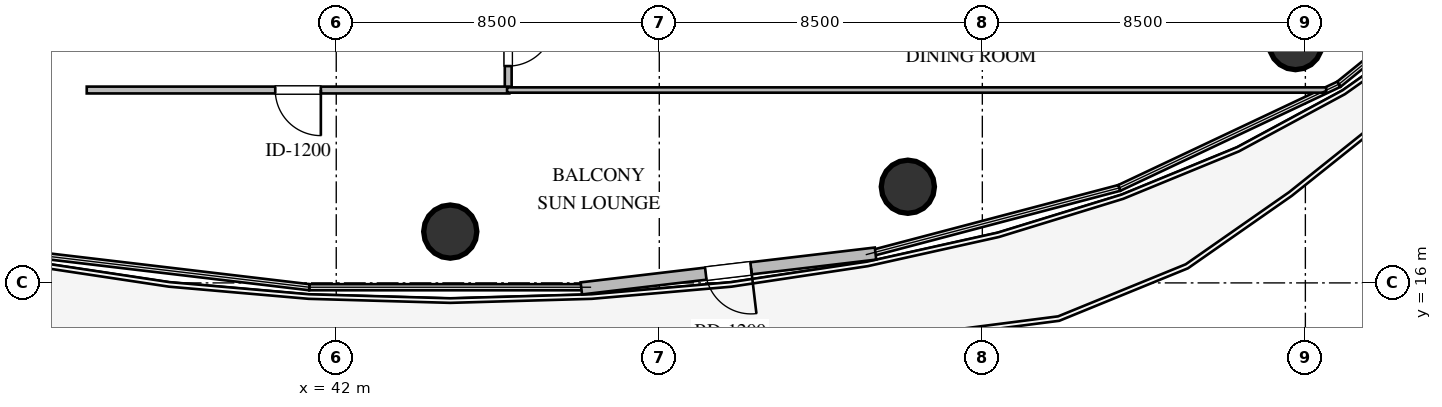
"""IFC4 building model, lengths in metres.
Left out: names, types, materials, properties, quantities, classifications, styles, units other than length and angle.
Written with IfcOpenShell. Run it as: python <this file> out.ifc"""

import sys

from ifc_helpers import new_model, si_unit, direction, frame, frame_2d, origin, origin_2d, place, context, subcontext, project, spatial, rectangle, circle, extrude, element, fill, save


model = new_model("IFC4")
c1 = context("Model", 3, precision=1e-05, world=origin(), true_north=direction((0.0, 1.0)))
c2 = subcontext(c1, "Body", "Model", "MODEL_VIEW")
j1 = project(units=[si_unit("LENGTHUNIT", "METRE"), si_unit("PLANEANGLEUNIT", "RADIAN")], contexts=[c1])
p1 = place(None, origin())
s1 = spatial("IfcSite", under=j1, at=p1, CompositionType="ELEMENT")
p2 = place(p1, origin())
s2 = spatial("IfcBuilding", under=s1, at=p2, CompositionType="ELEMENT")
p3 = place(p2, frame((0.0, 0.0, 78.0)))
s3 = spatial("IfcBuildingStorey", under=s2, at=p3, CompositionType="ELEMENT", Elevation=78.0)
for number, where, z_axis, x_axis in (
    (1, (45.0, 17.35, 0.0), (0.0, 0.0, 1.0), (1.0, 0.0, 0.0)),
    (2, (57.04, 18.53, 0.0), (0.0, 0.0, 1.0), (1.0, 0.0, 0.0)),
    (3, (67.24, 22.31, 0.0), (0.0, 0.0, 1.0), (1.0, 0.0, 0.0)),
):
    element("IfcColumn", number, at=place(p3, frame(where, z_axis=z_axis, x_axis=x_axis)), inside=s3, PredefinedType="COLUMN", context=c2, shape_type="SweptSolid", body=[
        extrude(circle(Radius=0.7, at=origin_2d()), origin(), (0.0, 0.0, 1.0), 3.6),
    ])
p4 = place(p3, frame((56.19, 16.772, 0.0), z_axis=(0.0, 0.0, 1.0), x_axis=(-0.993056646691, -0.117637138959, 0.0)))
e4 = element("IfcWall", 4, at=p4, inside=s3, PredefinedType="STANDARD", context=c2, shape_type="SweptSolid", body=[
    extrude(rectangle(XDim=7.795, YDim=0.32, at=frame_2d((3.897, 0.0))), origin(), (0.0, 0.0, 1.0), 3.36),
])
p5 = place(p4, frame((3.298, 0.0, 0.0)))
e5 = element("IfcOpeningElement", 5, at=p5, cuts=e4, PredefinedType="OPENING", context=c2, shape_type="SweptSolid", body=[
    extrude(rectangle(XDim=1.2, YDim=2.15, at=frame_2d((0.6, 1.075))), frame((0.0, 0.17, 0.0), z_axis=(0.0, -1.0, 0.0), x_axis=(1.0, 0.0, 0.0)), (0.0, 0.0, 1.0), 0.34),
])
p6 = place(p3, frame((46.525, 23.565, 0.0), z_axis=(0.0, 0.0, 1.0), x_axis=(0.0, -1.0, 0.0)))
e6 = element("IfcWall", 6, at=p6, inside=s3, PredefinedType="PARTITIONING", context=c2, shape_type="SweptSolid", body=[
    extrude(rectangle(XDim=2.52, YDim=0.18, at=frame_2d((1.26, 0.0))), origin(), (0.0, 0.0, 1.0), 3.36),
])
p7 = place(p6, frame((0.66, 0.0, 0.0)))
e7 = element("IfcOpeningElement", 7, at=p7, cuts=e6, PredefinedType="OPENING", context=c2, shape_type="SweptSolid", body=[
    extrude(rectangle(XDim=1.2, YDim=2.15, at=frame_2d((0.6, 1.075))), frame((0.0, 0.1, 0.0), z_axis=(0.0, -1.0, 0.0), x_axis=(1.0, 0.0, 0.0)), (0.0, 0.0, 1.0), 0.2),
])
p8 = place(p3, frame((46.555, 21.075, 0.0), z_axis=(0.0, 0.0, 1.0), x_axis=(-1.0, 0.0, 0.0)))
e8 = element("IfcWall", 8, at=p8, inside=s3, PredefinedType="PARTITIONING", context=c2, shape_type="SweptSolid", body=[
    extrude(rectangle(XDim=11.12, YDim=0.18, at=frame_2d((5.56, 0.0))), origin(), (0.0, 0.0, 1.0), 2.996),
])
p9 = place(p8, frame((4.96, 0.0, 0.0)))
e9 = element("IfcOpeningElement", 9, at=p9, cuts=e8, PredefinedType="OPENING", context=c2, shape_type="SweptSolid", body=[
    extrude(rectangle(XDim=1.2, YDim=2.15, at=frame_2d((0.6, 1.075))), frame((0.0, 0.1, 0.0), z_axis=(0.0, -1.0, 0.0), x_axis=(1.0, 0.0, 0.0)), (0.0, 0.0, 1.0), 0.2),
])
p10 = place(p3, frame((68.049, 21.075, 0.0), z_axis=(0.0, 0.0, 1.0), x_axis=(-1.0, 0.0, 0.0)))
e10 = element("IfcWall", 10, at=p10, inside=s3, PredefinedType="PARTITIONING", context=c2, shape_type="SweptSolid", body=[
    extrude(rectangle(XDim=21.554, YDim=0.14, at=frame_2d((10.777, 0.0))), origin(), (0.0, 0.0, 1.0), 2.996),
])
p11 = place(p5, origin())
e11 = element("IfcDoor", 11, at=p11, inside=s3, OperationType="SINGLE_SWING_LEFT", PredefinedType="DOOR", context=c2, shape_type="SweptSolid", body=[
    extrude(rectangle(XDim=1.2, YDim=2.15, at=frame_2d((0.6, 1.075))), frame((0.0, 0.025, 0.0), z_axis=(0.0, -1.0, 0.0), x_axis=(1.0, 0.0, 0.0)), (0.0, 0.0, 1.0), 0.05),
])
fill(e5, e11)
p12 = place(p7, origin())
e12 = element("IfcDoor", 12, at=p12, inside=s3, OperationType="SINGLE_SWING_LEFT", PredefinedType="DOOR", context=c2, shape_type="SweptSolid", body=[
    extrude(rectangle(XDim=1.2, YDim=2.15, at=frame_2d((0.6, 1.075))), frame((0.0, 0.025, 0.0), z_axis=(0.0, -1.0, 0.0), x_axis=(1.0, 0.0, 0.0)), (0.0, 0.0, 1.0), 0.05),
])
fill(e7, e12)
p13 = place(p9, origin())
e13 = element("IfcDoor", 13, at=p13, inside=s3, OperationType="SINGLE_SWING_LEFT", PredefinedType="DOOR", context=c2, shape_type="SweptSolid", body=[
    extrude(rectangle(XDim=1.2, YDim=2.15, at=frame_2d((0.6, 1.075))), frame((0.0, 0.025, 0.0), z_axis=(0.0, -1.0, 0.0), x_axis=(1.0, 0.0, 0.0)), (0.0, 0.0, 1.0), 0.05),
])
fill(e9, e13)
save(model, sys.argv[1])
